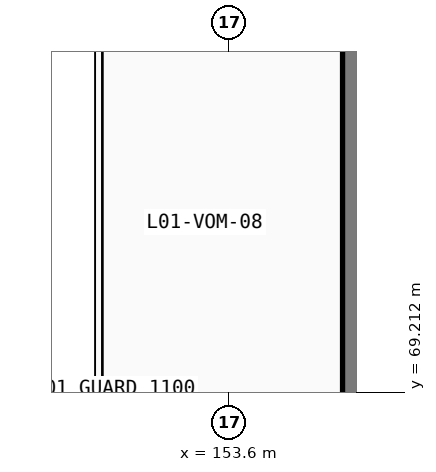
"""IFC4 building model, lengths in metres.
Left out: names, types, materials, properties, quantities, classifications, styles, units other than length and angle.
Written with IfcOpenShell. Run it as: python <this file> out.ifc"""

import sys

from ifc_helpers import new_model, si_unit, direction, frame, frame_2d, origin, place, context, subcontext, project, spatial, rectangle, extrude, element, save


model = new_model("IFC4")
c1 = context("Model", 3, precision=1e-05, world=origin(), true_north=direction((0.0, 1.0)))
c2 = subcontext(c1, "Body", "Model", "MODEL_VIEW")
j1 = project(units=[si_unit("LENGTHUNIT", "METRE"), si_unit("PLANEANGLEUNIT", "RADIAN")], contexts=[c1])
p1 = place(None, origin())
s1 = spatial("IfcSite", under=j1, at=p1, CompositionType="ELEMENT")
p2 = place(p1, origin())
s2 = spatial("IfcBuilding", under=s1, at=p2, CompositionType="ELEMENT")
p3 = place(p2, frame((0.0, 0.0, 4.8)))
s3 = spatial("IfcBuildingStorey", under=s2, at=p3, CompositionType="ELEMENT", Elevation=4.8)
p4 = place(p3, frame((155.67, 75.73, 0.0), z_axis=(0.0, 0.0, 1.0), x_axis=(0.0, -1.0, 0.0)))
e1 = element("IfcWall", 1, at=p4, inside=s3, PredefinedType="SHEAR", context=c2, shape_type="SweptSolid", body=[
    extrude(rectangle(XDim=7.26, YDim=0.4, at=frame_2d((3.63, 0.0))), origin(), (0.0, 0.0, 1.0), 4.52),
])
save(model, sys.argv[1])
